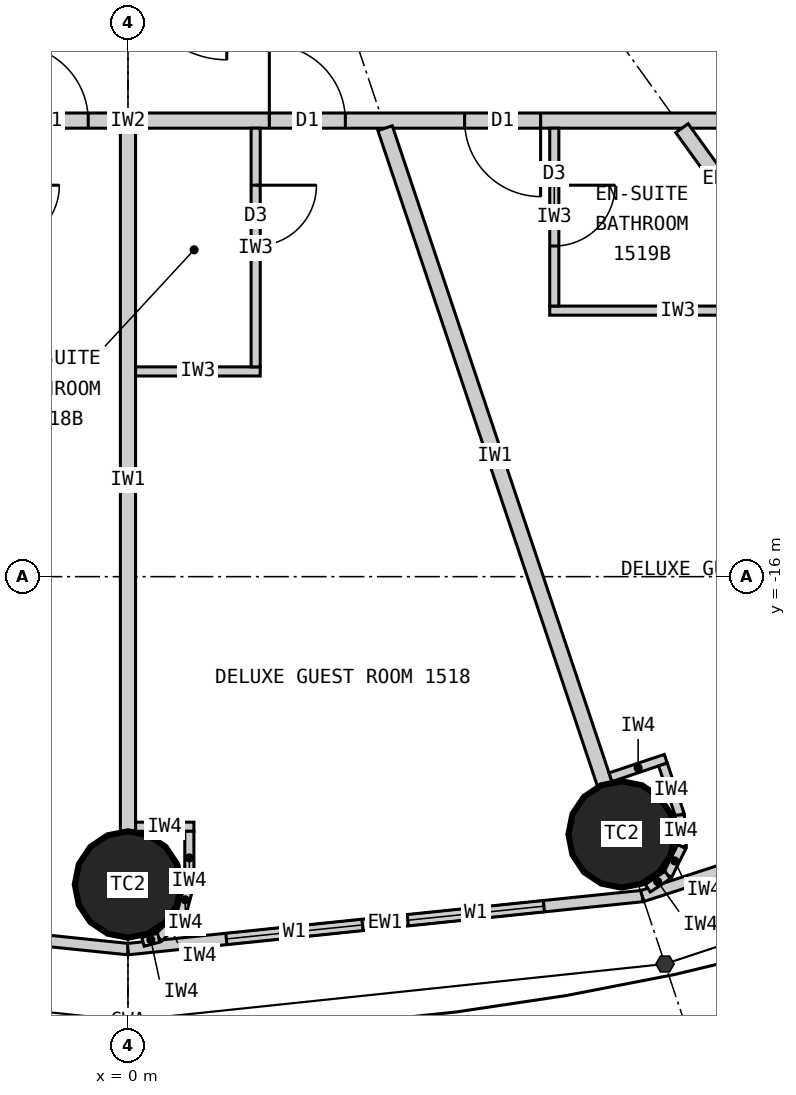
"""IFC4 building model, lengths in metres.
Left out: names, types, materials, properties, quantities, classifications, styles, units other than length and angle.
Written with IfcOpenShell. Run it as: python <this file> out.ifc"""

import sys

from ifc_helpers import new_model, si_unit, direction, frame, frame_2d, origin, origin_2d, place, context, subcontext, project, spatial, rectangle, circle, extrude, element, fill, save


model = new_model("IFC4")
c1 = context("Model", 3, precision=1e-05, world=origin(), true_north=direction((0.0, 1.0)))
c2 = subcontext(c1, "Body", "Model", "MODEL_VIEW")
j1 = project(units=[si_unit("LENGTHUNIT", "METRE"), si_unit("PLANEANGLEUNIT", "RADIAN")], contexts=[c1])
p1 = place(None, origin())
s1 = spatial("IfcSite", under=j1, at=p1, CompositionType="ELEMENT")
p2 = place(p1, origin())
s2 = spatial("IfcBuilding", under=s1, at=p2, CompositionType="ELEMENT")
p3 = place(p2, frame((0.0, 0.0, 63.9)))
s3 = spatial("IfcBuildingStorey", under=s2, at=p3, CompositionType="ELEMENT", Elevation=63.9)
for number, where, z_axis, x_axis in (
    (1, (0.0, -20.05, 0.0), (0.0, 0.0, 1.0), (1.0, 0.0, 0.0)),
    (2, (6.495, -19.391, 0.0), (0.0, 0.0, 1.0), (1.0, 0.0, 0.0)),
):
    element("IfcColumn", number, at=place(p3, frame(where, z_axis=z_axis, x_axis=x_axis)), inside=s3, PredefinedType="COLUMN", context=c2, shape_type="SweptSolid", body=[
        extrude(circle(Radius=0.7, at=origin_2d()), origin(), (0.0, 0.0, 1.0), 3.3),
    ])
p4 = place(p3, frame((-6.766, -20.202, 0.0), z_axis=(0.0, 0.0, 1.0), x_axis=(0.994721394369, -0.102612609291, 0.0)))
e3 = element("IfcWall", 3, at=p4, inside=s3, PredefinedType="ELEMENTEDWALL", context=c2, shape_type="SweptSolid", body=[
    extrude(rectangle(XDim=6.802, YDim=0.15, at=frame_2d((3.401, 0.0))), origin(), (0.0, 0.0, 1.0), 3.12),
])
p5 = place(p4, frame((1.301, 0.0, 0.9)))
e4 = element("IfcOpeningElement", 4, at=p5, cuts=e3, PredefinedType="OPENING", context=c2, shape_type="SweptSolid", body=[
    extrude(rectangle(XDim=1.8, YDim=1.9, at=frame_2d((0.9, 0.95))), frame((0.0, 0.085, 0.0), z_axis=(0.0, -1.0, 0.0), x_axis=(1.0, 0.0, 0.0)), (0.0, 0.0, 1.0), 0.17),
])
p6 = place(p4, frame((3.701, 0.0, 0.9)))
e5 = element("IfcOpeningElement", 5, at=p6, cuts=e3, PredefinedType="OPENING", context=c2, shape_type="SweptSolid", body=[
    extrude(rectangle(XDim=1.8, YDim=1.9, at=frame_2d((0.9, 0.95))), frame((0.0, 0.085, 0.0), z_axis=(0.0, -1.0, 0.0), x_axis=(1.0, 0.0, 0.0)), (0.0, 0.0, 1.0), 0.17),
])
p7 = place(p3, frame((0.0, -20.9, 0.0), z_axis=(0.0, 0.0, 1.0), x_axis=(0.994721394369, 0.102612609291, 0.0)))
e6 = element("IfcWall", 6, at=p7, inside=s3, PredefinedType="ELEMENTEDWALL", context=c2, shape_type="SweptSolid", body=[
    extrude(rectangle(XDim=6.802, YDim=0.15, at=frame_2d((3.401, 0.0))), origin(), (0.0, 0.0, 1.0), 3.12),
])
p8 = place(p7, frame((1.301, 0.0, 0.9)))
e7 = element("IfcOpeningElement", 7, at=p8, cuts=e6, PredefinedType="OPENING", context=c2, shape_type="SweptSolid", body=[
    extrude(rectangle(XDim=1.8, YDim=1.9, at=frame_2d((0.9, 0.95))), frame((0.0, 0.085, 0.0), z_axis=(0.0, -1.0, 0.0), x_axis=(1.0, 0.0, 0.0)), (0.0, 0.0, 1.0), 0.17),
])
p9 = place(p7, frame((3.701, 0.0, 0.9)))
e8 = element("IfcOpeningElement", 8, at=p9, cuts=e6, PredefinedType="OPENING", context=c2, shape_type="SweptSolid", body=[
    extrude(rectangle(XDim=1.8, YDim=1.9, at=frame_2d((0.9, 0.95))), frame((0.0, 0.085, 0.0), z_axis=(0.0, -1.0, 0.0), x_axis=(1.0, 0.0, 0.0)), (0.0, 0.0, 1.0), 0.17),
])
p10 = place(p3, frame((6.766, -20.202, 0.0), z_axis=(0.0, 0.0, 1.0), x_axis=(0.951137534625, 0.308767534285, 0.0)))
e9 = element("IfcWall", 9, at=p10, inside=s3, PredefinedType="ELEMENTEDWALL", context=c2, shape_type="SweptSolid", body=[
    extrude(rectangle(XDim=6.655, YDim=0.15, at=frame_2d((3.328, 0.0))), origin(), (0.0, 0.0, 1.0), 3.12),
])
p11 = place(p10, frame((1.228, 0.0, 0.9)))
e10 = element("IfcOpeningElement", 10, at=p11, cuts=e9, PredefinedType="OPENING", context=c2, shape_type="SweptSolid", body=[
    extrude(rectangle(XDim=1.8, YDim=1.9, at=frame_2d((0.9, 0.95))), frame((0.0, 0.085, 0.0), z_axis=(0.0, -1.0, 0.0), x_axis=(1.0, 0.0, 0.0)), (0.0, 0.0, 1.0), 0.17),
])
p12 = place(p10, frame((3.628, 0.0, 0.9)))
e11 = element("IfcOpeningElement", 11, at=p12, cuts=e9, PredefinedType="OPENING", context=c2, shape_type="SweptSolid", body=[
    extrude(rectangle(XDim=1.8, YDim=1.9, at=frame_2d((0.9, 0.95))), frame((0.0, 0.085, 0.0), z_axis=(0.0, -1.0, 0.0), x_axis=(1.0, 0.0, 0.0)), (0.0, 0.0, 1.0), 0.17),
])
p13 = place(p3, frame((14.1, -10.0, 0.0), z_axis=(0.0, 0.0, 1.0), x_axis=(-1.0, 0.0, 0.0)))
e12 = element("IfcWall", 12, at=p13, inside=s3, PredefinedType="PARTITIONING", context=c2, shape_type="SweptSolid", body=[
    extrude(rectangle(XDim=28.2, YDim=0.2, at=frame_2d((14.1, 0.0))), origin(), (0.0, 0.0, 1.0), 3.12),
])
p14 = place(p13, frame((23.865, 0.0, 0.0)))
e13 = element("IfcOpeningElement", 13, at=p14, cuts=e12, PredefinedType="OPENING", context=c2, shape_type="SweptSolid", body=[
    extrude(rectangle(XDim=1.0, YDim=2.2, at=frame_2d((0.5, 1.1))), frame((0.0, 0.11, 0.0), z_axis=(0.0, -1.0, 0.0), x_axis=(1.0, 0.0, 0.0)), (0.0, 0.0, 1.0), 0.22),
])
p15 = place(p13, frame((18.529, 0.0, 0.0)))
e14 = element("IfcOpeningElement", 14, at=p15, cuts=e12, PredefinedType="OPENING", context=c2, shape_type="SweptSolid", body=[
    extrude(rectangle(XDim=1.0, YDim=2.2, at=frame_2d((0.5, 1.1))), frame((0.0, 0.11, 0.0), z_axis=(0.0, -1.0, 0.0), x_axis=(1.0, 0.0, 0.0)), (0.0, 0.0, 1.0), 0.22),
])
p16 = place(p13, frame((14.623, 0.0, 0.0)))
e15 = element("IfcOpeningElement", 15, at=p16, cuts=e12, PredefinedType="OPENING", context=c2, shape_type="SweptSolid", body=[
    extrude(rectangle(XDim=1.0, YDim=2.2, at=frame_2d((0.5, 1.1))), frame((0.0, 0.11, 0.0), z_axis=(0.0, -1.0, 0.0), x_axis=(1.0, 0.0, 0.0)), (0.0, 0.0, 1.0), 0.22),
])
p17 = place(p13, frame((11.24, 0.0, 0.0)))
e16 = element("IfcOpeningElement", 16, at=p17, cuts=e12, PredefinedType="OPENING", context=c2, shape_type="SweptSolid", body=[
    extrude(rectangle(XDim=1.0, YDim=2.2, at=frame_2d((0.5, 1.1))), frame((0.0, 0.11, 0.0), z_axis=(0.0, -1.0, 0.0), x_axis=(1.0, 0.0, 0.0)), (0.0, 0.0, 1.0), 0.22),
])
p18 = place(p13, frame((8.671, 0.0, 0.0)))
e17 = element("IfcOpeningElement", 17, at=p18, cuts=e12, PredefinedType="OPENING", context=c2, shape_type="SweptSolid", body=[
    extrude(rectangle(XDim=1.0, YDim=2.2, at=frame_2d((0.5, 1.1))), frame((0.0, 0.11, 0.0), z_axis=(0.0, -1.0, 0.0), x_axis=(1.0, 0.0, 0.0)), (0.0, 0.0, 1.0), 0.22),
])
p19 = place(p13, frame((2.801, 0.0, 0.0)))
e18 = element("IfcOpeningElement", 18, at=p19, cuts=e12, PredefinedType="OPENING", context=c2, shape_type="SweptSolid", body=[
    extrude(rectangle(XDim=1.0, YDim=2.2, at=frame_2d((0.5, 1.1))), frame((0.0, 0.11, 0.0), z_axis=(0.0, -1.0, 0.0), x_axis=(1.0, 0.0, 0.0)), (0.0, 0.0, 1.0), 0.22),
])
p20 = place(p3, frame((0.0, -10.1, 0.0), z_axis=(0.0, 0.0, 1.0), x_axis=(0.0, -1.0, 0.0)))
e19 = element("IfcWall", 19, at=p20, inside=s3, PredefinedType="PARTITIONING", context=c2, shape_type="SweptSolid", body=[
    extrude(rectangle(XDim=9.25, YDim=0.2, at=frame_2d((4.625, 0.0))), origin(), (0.0, 0.0, 1.0), 2.32),
])
p21 = place(p3, frame((3.383, -10.1, 0.0), z_axis=(0.0, 0.0, 1.0), x_axis=(0.31759592231, -0.948226149256, 0.0)))
e20 = element("IfcWall", 20, at=p21, inside=s3, PredefinedType="PARTITIONING", context=c2, shape_type="SweptSolid", body=[
    extrude(rectangle(XDim=9.098, YDim=0.2, at=frame_2d((4.549, 0.0))), origin(), (0.0, 0.0, 1.0), 2.32),
])
p22 = place(p3, frame((7.289, -10.1, 0.0), z_axis=(0.0, 0.0, 1.0), x_axis=(0.585198353053, -0.810890182197, 0.0)))
e21 = element("IfcWall", 21, at=p22, inside=s3, PredefinedType="PARTITIONING", context=c2, shape_type="SweptSolid", body=[
    extrude(rectangle(XDim=8.36, YDim=0.2, at=frame_2d((4.18, 0.0))), origin(), (0.0, 0.0, 1.0), 2.32),
])
p23 = place(p3, frame((0.1, -13.3, 0.0), z_axis=(0.0, 0.0, 1.0), x_axis=(1.0, 0.0, 0.0)))
e22 = element("IfcWall", 22, at=p23, inside=s3, PredefinedType="PARTITIONING", context=c2, shape_type="SweptSolid", body=[
    extrude(rectangle(XDim=1.64, YDim=0.12, at=frame_2d((0.82, 0.0))), origin(), (0.0, 0.0, 1.0), 3.12),
])
p24 = place(p3, frame((1.68, -10.1, 0.0), z_axis=(0.0, 0.0, 1.0), x_axis=(0.0, -1.0, 0.0)))
e23 = element("IfcWall", 23, at=p24, inside=s3, PredefinedType="PARTITIONING", context=c2, shape_type="SweptSolid", body=[
    extrude(rectangle(XDim=3.14, YDim=0.12, at=frame_2d((1.57, 0.0))), origin(), (0.0, 0.0, 1.0), 3.12),
])
p25 = place(p24, frame((0.75, 0.0, 0.0)))
e24 = element("IfcOpeningElement", 24, at=p25, cuts=e23, PredefinedType="OPENING", context=c2, shape_type="SweptSolid", body=[
    extrude(rectangle(XDim=0.8, YDim=2.1, at=frame_2d((0.4, 1.05))), frame((0.0, 0.07, 0.0), z_axis=(0.0, -1.0, 0.0), x_axis=(1.0, 0.0, 0.0)), (0.0, 0.0, 1.0), 0.14),
])
p26 = place(p3, frame((8.921, -12.5, 0.0), z_axis=(0.0, 0.0, 1.0), x_axis=(-1.0, 0.0, 0.0)))
e25 = element("IfcWall", 25, at=p26, inside=s3, PredefinedType="PARTITIONING", context=c2, shape_type="SweptSolid", body=[
    extrude(rectangle(XDim=3.372, YDim=0.12, at=frame_2d((1.686, 0.0))), origin(), (0.0, 0.0, 1.0), 3.12),
])
p27 = place(p3, frame((5.609, -10.1, 0.0), z_axis=(0.0, 0.0, 1.0), x_axis=(0.0, -1.0, 0.0)))
e26 = element("IfcWall", 26, at=p27, inside=s3, PredefinedType="PARTITIONING", context=c2, shape_type="SweptSolid", body=[
    extrude(rectangle(XDim=2.34, YDim=0.12, at=frame_2d((1.17, 0.0))), origin(), (0.0, 0.0, 1.0), 3.12),
])
p28 = place(p27, frame((0.75, 0.0, 0.0)))
e27 = element("IfcOpeningElement", 27, at=p28, cuts=e26, PredefinedType="OPENING", context=c2, shape_type="SweptSolid", body=[
    extrude(rectangle(XDim=0.8, YDim=2.1, at=frame_2d((0.4, 1.05))), frame((0.0, 0.07, 0.0), z_axis=(0.0, -1.0, 0.0), x_axis=(1.0, 0.0, 0.0)), (0.0, 0.0, 1.0), 0.14),
])
p29 = place(p3, frame((0.1, -19.29, 0.0), z_axis=(0.0, 0.0, 1.0), x_axis=(1.0, 0.0, 0.0)))
e28 = element("IfcWall", 28, at=p29, inside=s3, PredefinedType="PARTITIONING", context=c2, shape_type="SweptSolid", body=[
    extrude(rectangle(XDim=0.767, YDim=0.12, at=frame_2d((0.384, 0.0))), origin(), (0.0, 0.0, 1.0), 3.12),
])
p30 = place(p3, frame((0.808, -19.35, 0.0), z_axis=(0.0, 0.0, 1.0), x_axis=(0.0, -1.0, 0.0)))
e29 = element("IfcWall", 29, at=p30, inside=s3, PredefinedType="PARTITIONING", context=c2, shape_type="SweptSolid", body=[
    extrude(rectangle(XDim=0.7, YDim=0.12, at=frame_2d((0.35, 0.0))), origin(), (0.0, 0.0, 1.0), 3.12),
])
p31 = place(p3, frame((0.808, -20.05, 0.0), z_axis=(0.0, 0.0, 1.0), x_axis=(-0.2592614205, -0.965807183573, 0.0)))
e30 = element("IfcWall", 30, at=p31, inside=s3, PredefinedType="PARTITIONING", context=c2, shape_type="SweptSolid", body=[
    extrude(rectangle(XDim=0.418, YDim=0.12, at=frame_2d((0.209, 0.0))), origin(), (0.0, 0.0, 1.0), 3.12),
])
p32 = place(p3, frame((0.699, -20.454, 0.0), z_axis=(0.0, 0.0, 1.0), x_axis=(-0.707106781187, -0.707106781187, 0.0)))
e31 = element("IfcWall", 31, at=p32, inside=s3, PredefinedType="PARTITIONING", context=c2, shape_type="SweptSolid", body=[
    extrude(rectangle(XDim=0.418, YDim=0.12, at=frame_2d((0.209, 0.0))), origin(), (0.0, 0.0, 1.0), 3.12),
])
p33 = place(p3, frame((0.404, -20.749, 0.0), z_axis=(0.0, 0.0, 1.0), x_axis=(-0.965759066438, -0.25944060128, 0.0)))
e32 = element("IfcWall", 32, at=p33, inside=s3, PredefinedType="PARTITIONING", context=c2, shape_type="SweptSolid", body=[
    extrude(rectangle(XDim=0.214, YDim=0.12, at=frame_2d((0.107, 0.0))), origin(), (0.0, 0.0, 1.0), 3.12),
])
p34 = place(p3, frame((6.348, -18.639, 0.0), z_axis=(0.0, 0.0, 1.0), x_axis=(0.948268951266, 0.317468102437, 0.0)))
e33 = element("IfcWall", 33, at=p34, inside=s3, PredefinedType="PARTITIONING", context=c2, shape_type="SweptSolid", body=[
    extrude(rectangle(XDim=0.768, YDim=0.12, at=frame_2d((0.384, 0.0))), origin(), (0.0, 0.0, 1.0), 3.12),
])
p35 = place(p3, frame((7.038, -18.471, 0.0), z_axis=(0.0, 0.0, 1.0), x_axis=(0.317378466199, -0.9482989556, 0.0)))
e34 = element("IfcWall", 34, at=p35, inside=s3, PredefinedType="PARTITIONING", context=c2, shape_type="SweptSolid", body=[
    extrude(rectangle(XDim=0.7, YDim=0.12, at=frame_2d((0.35, 0.0))), origin(), (0.0, 0.0, 1.0), 3.12),
])
p36 = place(p3, frame((7.26, -19.135, 0.0), z_axis=(0.0, 0.0, 1.0), x_axis=(0.0613238046, -0.99811792439, 0.0)))
e35 = element("IfcWall", 35, at=p36, inside=s3, PredefinedType="PARTITIONING", context=c2, shape_type="SweptSolid", body=[
    extrude(rectangle(XDim=0.418, YDim=0.12, at=frame_2d((0.209, 0.0))), origin(), (0.0, 0.0, 1.0), 3.12),
])
p37 = place(p3, frame((7.286, -19.552, 0.0), z_axis=(0.0, 0.0, 1.0), x_axis=(-0.445810757773, -0.89512723579, 0.0)))
e36 = element("IfcWall", 36, at=p37, inside=s3, PredefinedType="PARTITIONING", context=c2, shape_type="SweptSolid", body=[
    extrude(rectangle(XDim=0.418, YDim=0.12, at=frame_2d((0.209, 0.0))), origin(), (0.0, 0.0, 1.0), 3.12),
])
p38 = place(p3, frame((7.1, -19.926, 0.0), z_axis=(0.0, 0.0, 1.0), x_axis=(-0.833488262509, -0.552537162787, 0.0)))
e37 = element("IfcWall", 37, at=p38, inside=s3, PredefinedType="PARTITIONING", context=c2, shape_type="SweptSolid", body=[
    extrude(rectangle(XDim=0.313, YDim=0.12, at=frame_2d((0.156, 0.0))), origin(), (0.0, 0.0, 1.0), 3.12),
])
p39 = place(p8, origin())
e38 = element("IfcWindow", 38, at=p39, inside=s3, PartitioningType="SINGLE_PANEL", PredefinedType="WINDOW", context=c2, shape_type="SweptSolid", body=[
    extrude(rectangle(XDim=1.8, YDim=1.9, at=frame_2d((0.9, 0.95))), frame((0.0, 0.03, 0.0), z_axis=(0.0, -1.0, 0.0), x_axis=(1.0, 0.0, 0.0)), (0.0, 0.0, 1.0), 0.06),
])
fill(e7, e38)
p40 = place(p9, origin())
e39 = element("IfcWindow", 39, at=p40, inside=s3, PartitioningType="SINGLE_PANEL", PredefinedType="WINDOW", context=c2, shape_type="SweptSolid", body=[
    extrude(rectangle(XDim=1.8, YDim=1.9, at=frame_2d((0.9, 0.95))), frame((0.0, 0.03, 0.0), z_axis=(0.0, -1.0, 0.0), x_axis=(1.0, 0.0, 0.0)), (0.0, 0.0, 1.0), 0.06),
])
fill(e8, e39)
p41 = place(p16, origin())
e40 = element("IfcDoor", 40, at=p41, inside=s3, OperationType="SINGLE_SWING_RIGHT", PredefinedType="DOOR", context=c2, shape_type="SweptSolid", body=[
    extrude(rectangle(XDim=1.0, YDim=2.2, at=frame_2d((0.5, 1.1))), frame((0.0, 0.025, 0.0), z_axis=(0.0, -1.0, 0.0), x_axis=(1.0, 0.0, 0.0)), (0.0, 0.0, 1.0), 0.05),
])
fill(e15, e40)
p42 = place(p25, origin())
e41 = element("IfcDoor", 41, at=p42, inside=s3, OperationType="SINGLE_SWING_LEFT", PredefinedType="DOOR", context=c2, shape_type="SweptSolid", body=[
    extrude(rectangle(XDim=0.8, YDim=2.1, at=frame_2d((0.4, 1.05))), frame((0.0, 0.025, 0.0), z_axis=(0.0, -1.0, 0.0), x_axis=(1.0, 0.0, 0.0)), (0.0, 0.0, 1.0), 0.05),
])
fill(e24, e41)
p43 = place(p17, origin())
e42 = element("IfcDoor", 42, at=p43, inside=s3, OperationType="SINGLE_SWING_RIGHT", PredefinedType="DOOR", context=c2, shape_type="SweptSolid", body=[
    extrude(rectangle(XDim=1.0, YDim=2.2, at=frame_2d((0.5, 1.1))), frame((0.0, 0.025, 0.0), z_axis=(0.0, -1.0, 0.0), x_axis=(1.0, 0.0, 0.0)), (0.0, 0.0, 1.0), 0.05),
])
fill(e16, e42)
p44 = place(p28, origin())
e43 = element("IfcDoor", 43, at=p44, inside=s3, OperationType="SINGLE_SWING_LEFT", PredefinedType="DOOR", context=c2, shape_type="SweptSolid", body=[
    extrude(rectangle(XDim=0.8, YDim=2.1, at=frame_2d((0.4, 1.05))), frame((0.0, 0.025, 0.0), z_axis=(0.0, -1.0, 0.0), x_axis=(1.0, 0.0, 0.0)), (0.0, 0.0, 1.0), 0.05),
])
fill(e27, e43)
p45 = place(p18, origin())
e44 = element("IfcDoor", 44, at=p45, inside=s3, OperationType="SINGLE_SWING_LEFT", PredefinedType="DOOR", context=c2, shape_type="SweptSolid", body=[
    extrude(rectangle(XDim=1.0, YDim=2.2, at=frame_2d((0.5, 1.1))), frame((0.0, 0.025, 0.0), z_axis=(0.0, -1.0, 0.0), x_axis=(1.0, 0.0, 0.0)), (0.0, 0.0, 1.0), 0.05),
])
fill(e17, e44)
save(model, sys.argv[1])
